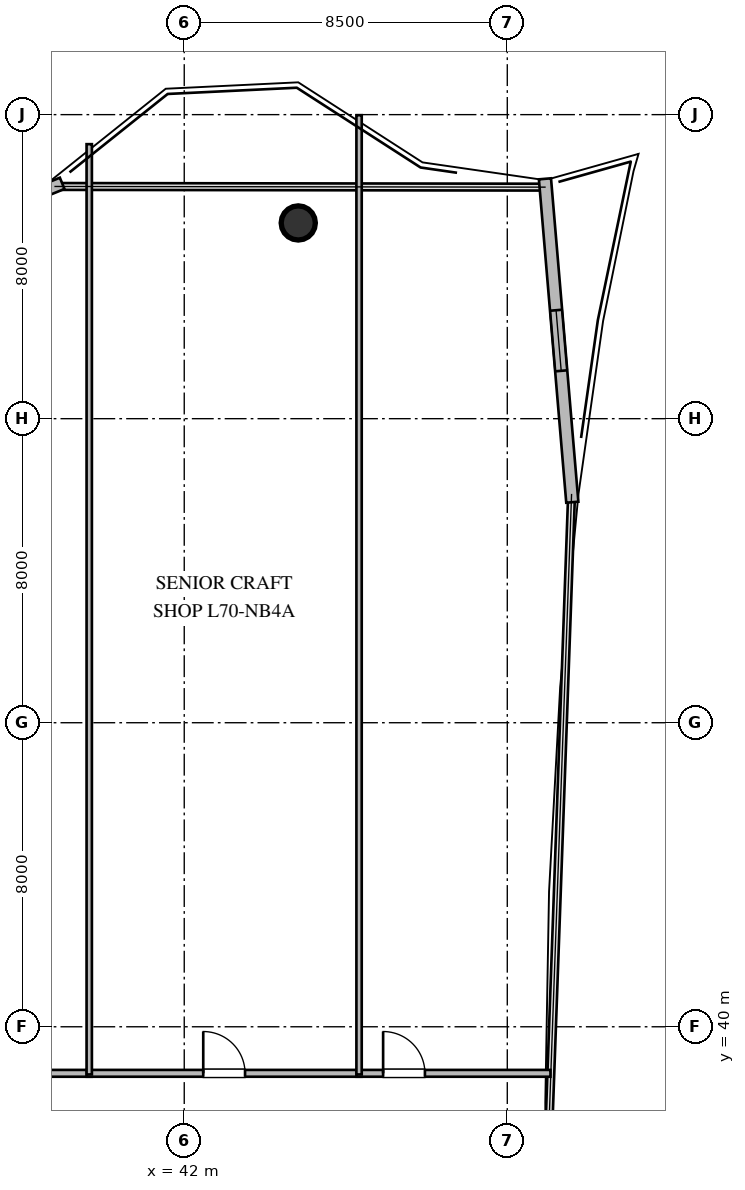
"""IFC4 building model, lengths in metres.
Left out: names, types, materials, properties, quantities, classifications, styles, units other than length and angle.
Written with IfcOpenShell. Run it as: python <this file> out.ifc"""

import sys

from ifc_helpers import new_model, si_unit, direction, frame, frame_2d, origin, origin_2d, place, context, subcontext, project, spatial, rectangle, circle, extrude, element, fill, save


model = new_model("IFC4")
c1 = context("Model", 3, precision=1e-05, world=origin(), true_north=direction((0.0, 1.0)))
c2 = subcontext(c1, "Body", "Model", "MODEL_VIEW")
j1 = project(units=[si_unit("LENGTHUNIT", "METRE"), si_unit("PLANEANGLEUNIT", "RADIAN")], contexts=[c1])
p1 = place(None, origin())
s1 = spatial("IfcSite", under=j1, at=p1, CompositionType="ELEMENT")
p2 = place(p1, origin())
s2 = spatial("IfcBuilding", under=s1, at=p2, CompositionType="ELEMENT")
p3 = place(p2, frame((0.0, 0.0, 266.2)))
s3 = spatial("IfcBuildingStorey", under=s2, at=p3, CompositionType="ELEMENT", Elevation=266.2)
p4 = place(p3, frame((45.0, 61.15, 0.0), z_axis=(0.0, 0.0, 1.0), x_axis=(1.0, 0.0, 0.0)))
e1 = element("IfcColumn", 1, at=p4, inside=s3, PredefinedType="COLUMN", context=c2, shape_type="SweptSolid", body=[
    extrude(circle(Radius=0.45, at=origin_2d()), origin(), (0.0, 0.0, 1.0), 3.8),
])
p5 = place(p3, frame((26.732, 57.267, 0.0), z_axis=(0.0, 0.0, 1.0), x_axis=(0.925709313248, 0.37823572989, 0.0)))
e2 = element("IfcWall", 2, at=p5, inside=s3, PredefinedType="STANDARD", context=c2, shape_type="SweptSolid", body=[
    extrude(rectangle(XDim=13.024, YDim=0.32, at=frame_2d((6.512, 0.0))), origin(), (0.0, 0.0, 1.0), 3.56),
])
p6 = place(p5, frame((5.712, 0.0, 1.05)))
e3 = element("IfcOpeningElement", 3, at=p6, cuts=e2, PredefinedType="OPENING", context=c2, shape_type="SweptSolid", body=[
    extrude(rectangle(XDim=1.6, YDim=1.5, at=frame_2d((0.8, 0.75))), frame((0.0, 0.17, 0.0), z_axis=(0.0, -1.0, 0.0), x_axis=(1.0, 0.0, 0.0)), (0.0, 0.0, 1.0), 0.34),
])
p7 = place(p3, frame((51.491, 62.311, 0.0), z_axis=(0.0, 0.0, 1.0), x_axis=(0.084311249843, -0.99643946788, 0.0)))
e4 = element("IfcWall", 4, at=p7, inside=s3, PredefinedType="STANDARD", context=c2, shape_type="SweptSolid", body=[
    extrude(rectangle(XDim=8.54, YDim=0.32, at=frame_2d((4.27, 0.0))), origin(), (0.0, 0.0, 1.0), 3.017),
])
p8 = place(p7, frame((3.47, 0.0, 1.05)))
e5 = element("IfcOpeningElement", 5, at=p8, cuts=e4, PredefinedType="OPENING", context=c2, shape_type="SweptSolid", body=[
    extrude(rectangle(XDim=1.6, YDim=1.5, at=frame_2d((0.8, 0.75))), frame((0.0, 0.17, 0.0), z_axis=(0.0, -1.0, 0.0), x_axis=(1.0, 0.0, 0.0)), (0.0, 0.0, 1.0), 0.34),
])
p9 = place(p3, frame((34.685, 38.775, 0.0), z_axis=(0.0, 0.0, 1.0), x_axis=(1.0, 0.0, 0.0)))
e6 = element("IfcWall", 6, at=p9, inside=s3, PredefinedType="PARTITIONING", context=c2, shape_type="SweptSolid", body=[
    extrude(rectangle(XDim=4.88, YDim=0.18, at=frame_2d((2.44, 0.0))), origin(), (0.0, 0.0, 1.0), 3.56),
])
p10 = place(p9, frame((1.89, 0.0, 0.0)))
e7 = element("IfcOpeningElement", 7, at=p10, cuts=e6, PredefinedType="OPENING", context=c2, shape_type="SweptSolid", body=[
    extrude(rectangle(XDim=1.1, YDim=2.1, at=frame_2d((0.55, 1.05))), frame((0.0, 0.1, 0.0), z_axis=(0.0, -1.0, 0.0), x_axis=(1.0, 0.0, 0.0)), (0.0, 0.0, 1.0), 0.2),
])
p11 = place(p3, frame((39.435, 38.775, 0.0), z_axis=(0.0, 0.0, 1.0), x_axis=(1.0, 0.0, 0.0)))
e8 = element("IfcWall", 8, at=p11, inside=s3, PredefinedType="PARTITIONING", context=c2, shape_type="SweptSolid", body=[
    extrude(rectangle(XDim=7.23, YDim=0.18, at=frame_2d((3.615, 0.0))), origin(), (0.0, 0.0, 1.0), 3.56),
])
p12 = place(p11, frame((3.065, 0.0, 0.0)))
e9 = element("IfcOpeningElement", 9, at=p12, cuts=e8, PredefinedType="OPENING", context=c2, shape_type="SweptSolid", body=[
    extrude(rectangle(XDim=1.1, YDim=2.1, at=frame_2d((0.55, 1.05))), frame((0.0, 0.1, 0.0), z_axis=(0.0, -1.0, 0.0), x_axis=(1.0, 0.0, 0.0)), (0.0, 0.0, 1.0), 0.2),
])
p13 = place(p3, frame((46.535, 38.775, 0.0), z_axis=(0.0, 0.0, 1.0), x_axis=(1.0, 0.0, 0.0)))
e10 = element("IfcWall", 10, at=p13, inside=s3, PredefinedType="PARTITIONING", context=c2, shape_type="SweptSolid", body=[
    extrude(rectangle(XDim=5.101, YDim=0.18, at=frame_2d((2.551, 0.0))), origin(), (0.0, 0.0, 1.0), 3.56),
])
p14 = place(p13, frame((0.698, 0.0, 0.0)))
e11 = element("IfcOpeningElement", 11, at=p14, cuts=e10, PredefinedType="OPENING", context=c2, shape_type="SweptSolid", body=[
    extrude(rectangle(XDim=1.1, YDim=2.1, at=frame_2d((0.55, 1.05))), frame((0.0, 0.1, 0.0), z_axis=(0.0, -1.0, 0.0), x_axis=(1.0, 0.0, 0.0)), (0.0, 0.0, 1.0), 0.2),
])
p15 = place(p3, frame((39.5, 63.223, 0.0), z_axis=(0.0, 0.0, 1.0), x_axis=(0.0, -1.0, 0.0)))
e12 = element("IfcWall", 12, at=p15, inside=s3, PredefinedType="PARTITIONING", context=c2, shape_type="SweptSolid", body=[
    extrude(rectangle(XDim=24.478, YDim=0.14, at=frame_2d((12.239, 0.0))), origin(), (0.0, 0.0, 1.0), 3.56),
])
p16 = place(p3, frame((46.6, 63.985, 0.0), z_axis=(0.0, 0.0, 1.0), x_axis=(0.0, -1.0, 0.0)))
e13 = element("IfcWall", 13, at=p16, inside=s3, PredefinedType="PARTITIONING", context=c2, shape_type="SweptSolid", body=[
    extrude(rectangle(XDim=25.24, YDim=0.14, at=frame_2d((12.62, 0.0))), origin(), (0.0, 0.0, 1.0), 3.56),
])
p17 = place(p8, origin())
e14 = element("IfcWindow", 14, at=p17, inside=s3, PartitioningType="SINGLE_PANEL", PredefinedType="WINDOW", context=c2, shape_type="SweptSolid", body=[
    extrude(rectangle(XDim=1.6, YDim=1.5, at=frame_2d((0.8, 0.75))), frame((0.0, 0.03, 0.0), z_axis=(0.0, -1.0, 0.0), x_axis=(1.0, 0.0, 0.0)), (0.0, 0.0, 1.0), 0.06),
])
fill(e5, e14)
p18 = place(p12, origin())
e15 = element("IfcDoor", 15, at=p18, inside=s3, OperationType="SINGLE_SWING_LEFT", PredefinedType="DOOR", context=c2, shape_type="SweptSolid", body=[
    extrude(rectangle(XDim=1.1, YDim=2.1, at=frame_2d((0.55, 1.05))), frame((0.0, 0.025, 0.0), z_axis=(0.0, -1.0, 0.0), x_axis=(1.0, 0.0, 0.0)), (0.0, 0.0, 1.0), 0.05),
])
fill(e9, e15)
p19 = place(p14, origin())
e16 = element("IfcDoor", 16, at=p19, inside=s3, OperationType="SINGLE_SWING_LEFT", PredefinedType="DOOR", context=c2, shape_type="SweptSolid", body=[
    extrude(rectangle(XDim=1.1, YDim=2.1, at=frame_2d((0.55, 1.05))), frame((0.0, 0.025, 0.0), z_axis=(0.0, -1.0, 0.0), x_axis=(1.0, 0.0, 0.0)), (0.0, 0.0, 1.0), 0.05),
])
fill(e11, e16)
save(model, sys.argv[1])
